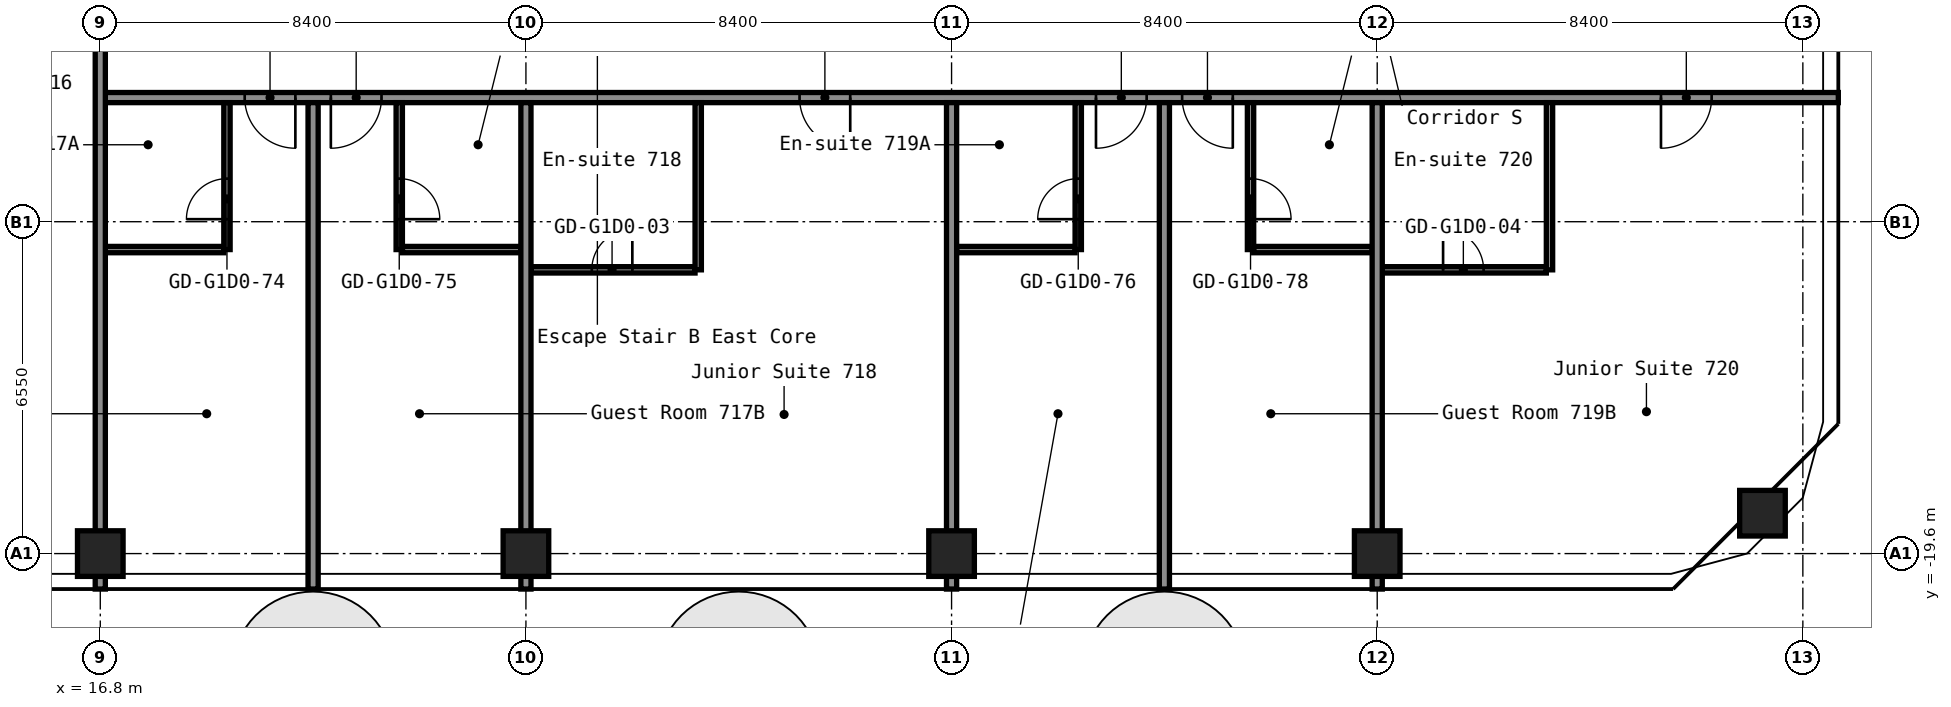
"""IFC4 building model, lengths in metres.
Left out: names, types, materials, properties, quantities, classifications, styles, units other than length and angle.
Written with IfcOpenShell. Run it as: python <this file> out.ifc"""

import sys

from ifc_helpers import new_model, si_unit, direction, frame, frame_2d, origin, origin_2d, place, context, subcontext, project, spatial, rectangle, hollow_rectangle, extrude, element, fill, save


model = new_model("IFC4")
c1 = context("Model", 3, precision=1e-05, world=origin(), true_north=direction((0.0, 1.0)))
c2 = subcontext(c1, "Body", "Model", "MODEL_VIEW")
j1 = project(units=[si_unit("LENGTHUNIT", "METRE"), si_unit("PLANEANGLEUNIT", "RADIAN")], contexts=[c1])
p1 = place(None, origin())
s1 = spatial("IfcSite", under=j1, at=p1, CompositionType="ELEMENT")
p2 = place(p1, origin())
s2 = spatial("IfcBuilding", under=s1, at=p2, CompositionType="ELEMENT")
p3 = place(p2, frame((0.0, 0.0, 29.4)))
s3 = spatial("IfcBuildingStorey", under=s2, at=p3, CompositionType="ELEMENT", Elevation=29.4)
for number, where, z_axis, x_axis in (
    (1, (16.8, -19.6, 0.0), (0.0, 0.0, 1.0), (1.0, 0.0, 0.0)),
    (2, (25.2, -19.6, 0.0), (0.0, 0.0, 1.0), (1.0, 0.0, 0.0)),
    (3, (33.6, -19.6, 0.0), (0.0, 0.0, 1.0), (1.0, 0.0, 0.0)),
    (4, (42.0, -19.6, 0.0), (0.0, 0.0, 1.0), (1.0, 0.0, 0.0)),
    (5, (49.603, -18.803, 0.0), (0.0, 0.0, 1.0), (1.0, 0.0, 0.0)),
):
    element("IfcColumn", number, at=place(p3, frame(where, z_axis=z_axis, x_axis=x_axis)), inside=s3, PredefinedType="COLUMN", context=c2, shape_type="SweptSolid", body=[
        extrude(hollow_rectangle(XDim=0.9, YDim=0.9, WallThickness=0.036, at=origin_2d()), origin(), (0.0, 0.0, 1.0), 2.8),
    ])
p4 = place(p3, frame((25.3, -14.0, 0.0), z_axis=(0.0, 0.0, 1.0), x_axis=(1.0, 0.0, 0.0)))
e6 = element("IfcWall", 6, at=p4, inside=s3, PredefinedType="PARTITIONING", context=c2, shape_type="SweptSolid", body=[
    extrude(rectangle(XDim=3.238, YDim=0.125, at=frame_2d((1.619, 0.0))), origin(), (0.0, 0.0, 1.0), 2.8),
])
p5 = place(p4, frame((1.2, 0.0, 0.0)))
e7 = element("IfcOpeningElement", 7, at=p5, cuts=e6, PredefinedType="OPENING", context=c2, shape_type="SweptSolid", body=[
    extrude(rectangle(XDim=0.8, YDim=2.1, at=frame_2d((0.4, 1.05))), frame((0.0, 0.073, 0.0), z_axis=(0.0, -1.0, 0.0), x_axis=(1.0, 0.0, 0.0)), (0.0, 0.0, 1.0), 0.145),
])
p6 = place(p3, frame((42.1, -14.0, 0.0), z_axis=(0.0, 0.0, 1.0), x_axis=(1.0, 0.0, 0.0)))
e8 = element("IfcWall", 8, at=p6, inside=s3, PredefinedType="PARTITIONING", context=c2, shape_type="SweptSolid", body=[
    extrude(rectangle(XDim=3.237, YDim=0.125, at=frame_2d((1.619, 0.0))), origin(), (0.0, 0.0, 1.0), 2.8),
])
p7 = place(p6, frame((1.2, 0.0, 0.0)))
e9 = element("IfcOpeningElement", 9, at=p7, cuts=e8, PredefinedType="OPENING", context=c2, shape_type="SweptSolid", body=[
    extrude(rectangle(XDim=0.8, YDim=2.1, at=frame_2d((0.4, 1.05))), frame((0.0, 0.073, 0.0), z_axis=(0.0, -1.0, 0.0), x_axis=(1.0, 0.0, 0.0)), (0.0, 0.0, 1.0), 0.145),
])
for number, where, z_axis, x_axis in (
    (10, (16.9, -13.6, 0.0), (0.0, 0.0, 1.0), (1.0, 0.0, 0.0)),
    (11, (22.762, -13.6, 0.0), (0.0, 0.0, 1.0), (1.0, 0.0, 0.0)),
    (12, (33.7, -13.6, 0.0), (0.0, 0.0, 1.0), (1.0, 0.0, 0.0)),
):
    element("IfcWall", number, at=place(p3, frame(where, z_axis=z_axis, x_axis=x_axis)), inside=s3, PredefinedType="PARTITIONING", context=c2, shape_type="SweptSolid", body=[
        extrude(rectangle(XDim=2.338, YDim=0.125, at=frame_2d((1.169, 0.0))), origin(), (0.0, 0.0, 1.0), 2.8),
    ])
p8 = place(p3, frame((39.562, -13.6, 0.0), z_axis=(0.0, 0.0, 1.0), x_axis=(1.0, 0.0, 0.0)))
e13 = element("IfcWall", 13, at=p8, inside=s3, PredefinedType="PARTITIONING", context=c2, shape_type="SweptSolid", body=[
    extrude(rectangle(XDim=2.337, YDim=0.125, at=frame_2d((1.169, 0.0))), origin(), (0.0, 0.0, 1.0), 2.8),
])
p9 = place(p3, frame((16.8, -10.6, 0.0), z_axis=(0.0, 0.0, 1.0), x_axis=(1.0, 0.0, 0.0)))
e14 = element("IfcWall", 14, at=p9, inside=s3, PredefinedType="PARTITIONING", context=c2, shape_type="SweptSolid", body=[
    extrude(rectangle(XDim=34.3, YDim=0.2, at=frame_2d((17.15, 0.0))), origin(), (0.0, 0.0, 1.0), 2.8),
])
p10 = place(p9, frame((2.85, 0.0, 0.0)))
e15 = element("IfcOpeningElement", 15, at=p10, cuts=e14, PredefinedType="OPENING", context=c2, shape_type="SweptSolid", body=[
    extrude(rectangle(XDim=1.0, YDim=2.1, at=frame_2d((0.5, 1.05))), frame((0.0, 0.11, 0.0), z_axis=(0.0, -1.0, 0.0), x_axis=(1.0, 0.0, 0.0)), (0.0, 0.0, 1.0), 0.22),
])
p11 = place(p9, frame((4.55, 0.0, 0.0)))
e16 = element("IfcOpeningElement", 16, at=p11, cuts=e14, PredefinedType="OPENING", context=c2, shape_type="SweptSolid", body=[
    extrude(rectangle(XDim=1.0, YDim=2.1, at=frame_2d((0.5, 1.05))), frame((0.0, 0.11, 0.0), z_axis=(0.0, -1.0, 0.0), x_axis=(1.0, 0.0, 0.0)), (0.0, 0.0, 1.0), 0.22),
])
p12 = place(p9, frame((13.8, 0.0, 0.0)))
e17 = element("IfcOpeningElement", 17, at=p12, cuts=e14, PredefinedType="OPENING", context=c2, shape_type="SweptSolid", body=[
    extrude(rectangle(XDim=1.0, YDim=2.1, at=frame_2d((0.5, 1.05))), frame((0.0, 0.11, 0.0), z_axis=(0.0, -1.0, 0.0), x_axis=(1.0, 0.0, 0.0)), (0.0, 0.0, 1.0), 0.22),
])
p13 = place(p9, frame((19.65, 0.0, 0.0)))
e18 = element("IfcOpeningElement", 18, at=p13, cuts=e14, PredefinedType="OPENING", context=c2, shape_type="SweptSolid", body=[
    extrude(rectangle(XDim=1.0, YDim=2.1, at=frame_2d((0.5, 1.05))), frame((0.0, 0.11, 0.0), z_axis=(0.0, -1.0, 0.0), x_axis=(1.0, 0.0, 0.0)), (0.0, 0.0, 1.0), 0.22),
])
p14 = place(p9, frame((21.35, 0.0, 0.0)))
e19 = element("IfcOpeningElement", 19, at=p14, cuts=e14, PredefinedType="OPENING", context=c2, shape_type="SweptSolid", body=[
    extrude(rectangle(XDim=1.0, YDim=2.1, at=frame_2d((0.5, 1.05))), frame((0.0, 0.11, 0.0), z_axis=(0.0, -1.0, 0.0), x_axis=(1.0, 0.0, 0.0)), (0.0, 0.0, 1.0), 0.22),
])
p15 = place(p9, frame((30.8, 0.0, 0.0)))
e20 = element("IfcOpeningElement", 20, at=p15, cuts=e14, PredefinedType="OPENING", context=c2, shape_type="SweptSolid", body=[
    extrude(rectangle(XDim=1.0, YDim=2.1, at=frame_2d((0.5, 1.05))), frame((0.0, 0.11, 0.0), z_axis=(0.0, -1.0, 0.0), x_axis=(1.0, 0.0, 0.0)), (0.0, 0.0, 1.0), 0.22),
])
p16 = place(p3, frame((16.8, -20.3, 0.0), z_axis=(0.0, 0.0, 1.0), x_axis=(0.0, 1.0, 0.0)))
e21 = element("IfcWall", 21, at=p16, inside=s3, PredefinedType="PARTITIONING", context=c2, shape_type="SweptSolid", body=[
    extrude(rectangle(XDim=11.91, YDim=0.2, at=frame_2d((5.955, 0.0))), origin(), (0.0, 0.0, 1.0), 2.8),
])
p17 = place(p3, frame((19.3, -13.6, 0.0), z_axis=(0.0, 0.0, 1.0), x_axis=(0.0, 1.0, 0.0)))
e22 = element("IfcWall", 22, at=p17, inside=s3, PredefinedType="PARTITIONING", context=c2, shape_type="SweptSolid", body=[
    extrude(rectangle(XDim=2.9, YDim=0.125, at=frame_2d((1.45, 0.0))), origin(), (0.0, 0.0, 1.0), 2.8),
])
p18 = place(p17, frame((0.6, 0.0, 0.0)))
e23 = element("IfcOpeningElement", 23, at=p18, cuts=e22, PredefinedType="OPENING", context=c2, shape_type="SweptSolid", body=[
    extrude(rectangle(XDim=0.8, YDim=2.1, at=frame_2d((0.4, 1.05))), frame((0.0, 0.073, 0.0), z_axis=(0.0, -1.0, 0.0), x_axis=(1.0, 0.0, 0.0)), (0.0, 0.0, 1.0), 0.145),
])
p19 = place(p3, frame((21.0, -20.3, 0.0), z_axis=(0.0, 0.0, 1.0), x_axis=(0.0, 1.0, 0.0)))
e24 = element("IfcWall", 24, at=p19, inside=s3, PredefinedType="PARTITIONING", context=c2, shape_type="SweptSolid", body=[
    extrude(rectangle(XDim=9.6, YDim=0.2, at=frame_2d((4.8, 0.0))), origin(), (0.0, 0.0, 1.0), 2.8),
])
p20 = place(p3, frame((22.7, -13.6, 0.0), z_axis=(0.0, 0.0, 1.0), x_axis=(0.0, 1.0, 0.0)))
e25 = element("IfcWall", 25, at=p20, inside=s3, PredefinedType="PARTITIONING", context=c2, shape_type="SweptSolid", body=[
    extrude(rectangle(XDim=2.9, YDim=0.125, at=frame_2d((1.45, 0.0))), origin(), (0.0, 0.0, 1.0), 2.8),
])
p21 = place(p20, frame((0.6, 0.0, 0.0)))
e26 = element("IfcOpeningElement", 26, at=p21, cuts=e25, PredefinedType="OPENING", context=c2, shape_type="SweptSolid", body=[
    extrude(rectangle(XDim=0.8, YDim=2.1, at=frame_2d((0.4, 1.05))), frame((0.0, 0.073, 0.0), z_axis=(0.0, -1.0, 0.0), x_axis=(1.0, 0.0, 0.0)), (0.0, 0.0, 1.0), 0.145),
])
p22 = place(p3, frame((25.2, -20.3, 0.0), z_axis=(0.0, 0.0, 1.0), x_axis=(0.0, 1.0, 0.0)))
e27 = element("IfcWall", 27, at=p22, inside=s3, PredefinedType="PARTITIONING", context=c2, shape_type="SweptSolid", body=[
    extrude(rectangle(XDim=9.6, YDim=0.2, at=frame_2d((4.8, 0.0))), origin(), (0.0, 0.0, 1.0), 2.8),
])
p23 = place(p3, frame((28.6, -14.0, 0.0), z_axis=(0.0, 0.0, 1.0), x_axis=(0.0, 1.0, 0.0)))
e28 = element("IfcWall", 28, at=p23, inside=s3, PredefinedType="PARTITIONING", context=c2, shape_type="SweptSolid", body=[
    extrude(rectangle(XDim=3.3, YDim=0.125, at=frame_2d((1.65, 0.0))), origin(), (0.0, 0.0, 1.0), 2.8),
])
p24 = place(p3, frame((33.6, -20.3, 0.0), z_axis=(0.0, 0.0, 1.0), x_axis=(0.0, 1.0, 0.0)))
e29 = element("IfcWall", 29, at=p24, inside=s3, PredefinedType="PARTITIONING", context=c2, shape_type="SweptSolid", body=[
    extrude(rectangle(XDim=9.6, YDim=0.2, at=frame_2d((4.8, 0.0))), origin(), (0.0, 0.0, 1.0), 2.8),
])
p25 = place(p3, frame((36.1, -13.6, 0.0), z_axis=(0.0, 0.0, 1.0), x_axis=(0.0, 1.0, 0.0)))
e30 = element("IfcWall", 30, at=p25, inside=s3, PredefinedType="PARTITIONING", context=c2, shape_type="SweptSolid", body=[
    extrude(rectangle(XDim=2.9, YDim=0.125, at=frame_2d((1.45, 0.0))), origin(), (0.0, 0.0, 1.0), 2.8),
])
p26 = place(p25, frame((0.6, 0.0, 0.0)))
e31 = element("IfcOpeningElement", 31, at=p26, cuts=e30, PredefinedType="OPENING", context=c2, shape_type="SweptSolid", body=[
    extrude(rectangle(XDim=0.8, YDim=2.1, at=frame_2d((0.4, 1.05))), frame((0.0, 0.073, 0.0), z_axis=(0.0, -1.0, 0.0), x_axis=(1.0, 0.0, 0.0)), (0.0, 0.0, 1.0), 0.145),
])
p27 = place(p3, frame((37.8, -20.3, 0.0), z_axis=(0.0, 0.0, 1.0), x_axis=(0.0, 1.0, 0.0)))
e32 = element("IfcWall", 32, at=p27, inside=s3, PredefinedType="PARTITIONING", context=c2, shape_type="SweptSolid", body=[
    extrude(rectangle(XDim=9.6, YDim=0.2, at=frame_2d((4.8, 0.0))), origin(), (0.0, 0.0, 1.0), 2.8),
])
p28 = place(p3, frame((39.5, -13.6, 0.0), z_axis=(0.0, 0.0, 1.0), x_axis=(0.0, 1.0, 0.0)))
e33 = element("IfcWall", 33, at=p28, inside=s3, PredefinedType="PARTITIONING", context=c2, shape_type="SweptSolid", body=[
    extrude(rectangle(XDim=2.9, YDim=0.125, at=frame_2d((1.45, 0.0))), origin(), (0.0, 0.0, 1.0), 2.8),
])
p29 = place(p28, frame((0.6, 0.0, 0.0)))
e34 = element("IfcOpeningElement", 34, at=p29, cuts=e33, PredefinedType="OPENING", context=c2, shape_type="SweptSolid", body=[
    extrude(rectangle(XDim=0.8, YDim=2.1, at=frame_2d((0.4, 1.05))), frame((0.0, 0.073, 0.0), z_axis=(0.0, -1.0, 0.0), x_axis=(1.0, 0.0, 0.0)), (0.0, 0.0, 1.0), 0.145),
])
p30 = place(p3, frame((42.0, -20.3, 0.0), z_axis=(0.0, 0.0, 1.0), x_axis=(0.0, 1.0, 0.0)))
e35 = element("IfcWall", 35, at=p30, inside=s3, PredefinedType="PARTITIONING", context=c2, shape_type="SweptSolid", body=[
    extrude(rectangle(XDim=9.6, YDim=0.2, at=frame_2d((4.8, 0.0))), origin(), (0.0, 0.0, 1.0), 2.8),
])
p31 = place(p3, frame((45.4, -14.0, 0.0), z_axis=(0.0, 0.0, 1.0), x_axis=(0.0, 1.0, 0.0)))
e36 = element("IfcWall", 36, at=p31, inside=s3, PredefinedType="PARTITIONING", context=c2, shape_type="SweptSolid", body=[
    extrude(rectangle(XDim=3.3, YDim=0.125, at=frame_2d((1.65, 0.0))), origin(), (0.0, 0.0, 1.0), 2.8),
])
p32 = place(p5, origin())
e37 = element("IfcDoor", 37, at=p32, inside=s3, OperationType="SINGLE_SWING_LEFT", PredefinedType="DOOR", context=c2, shape_type="SweptSolid", body=[
    extrude(rectangle(XDim=0.8, YDim=2.1, at=frame_2d((0.4, 1.05))), frame((0.0, 0.025, 0.0), z_axis=(0.0, -1.0, 0.0), x_axis=(1.0, 0.0, 0.0)), (0.0, 0.0, 1.0), 0.05),
])
fill(e7, e37)
p33 = place(p7, origin())
e38 = element("IfcDoor", 38, at=p33, inside=s3, OperationType="SINGLE_SWING_RIGHT", PredefinedType="DOOR", context=c2, shape_type="SweptSolid", body=[
    extrude(rectangle(XDim=0.8, YDim=2.1, at=frame_2d((0.4, 1.05))), frame((0.0, 0.025, 0.0), z_axis=(0.0, -1.0, 0.0), x_axis=(1.0, 0.0, 0.0)), (0.0, 0.0, 1.0), 0.05),
])
fill(e9, e38)
p34 = place(p10, origin())
e39 = element("IfcDoor", 39, at=p34, inside=s3, OperationType="SINGLE_SWING_RIGHT", PredefinedType="DOOR", context=c2, shape_type="SweptSolid", body=[
    extrude(rectangle(XDim=1.0, YDim=2.1, at=frame_2d((0.5, 1.05))), frame((0.0, 0.025, 0.0), z_axis=(0.0, -1.0, 0.0), x_axis=(1.0, 0.0, 0.0)), (0.0, 0.0, 1.0), 0.05),
])
fill(e15, e39)
p35 = place(p11, origin())
e40 = element("IfcDoor", 40, at=p35, inside=s3, OperationType="SINGLE_SWING_LEFT", PredefinedType="DOOR", context=c2, shape_type="SweptSolid", body=[
    extrude(rectangle(XDim=1.0, YDim=2.1, at=frame_2d((0.5, 1.05))), frame((0.0, 0.025, 0.0), z_axis=(0.0, -1.0, 0.0), x_axis=(1.0, 0.0, 0.0)), (0.0, 0.0, 1.0), 0.05),
])
fill(e16, e40)
p36 = place(p12, origin())
e41 = element("IfcDoor", 41, at=p36, inside=s3, OperationType="SINGLE_SWING_RIGHT", PredefinedType="DOOR", context=c2, shape_type="SweptSolid", body=[
    extrude(rectangle(XDim=1.0, YDim=2.1, at=frame_2d((0.5, 1.05))), frame((0.0, 0.025, 0.0), z_axis=(0.0, -1.0, 0.0), x_axis=(1.0, 0.0, 0.0)), (0.0, 0.0, 1.0), 0.05),
])
fill(e17, e41)
p37 = place(p13, origin())
e42 = element("IfcDoor", 42, at=p37, inside=s3, OperationType="SINGLE_SWING_LEFT", PredefinedType="DOOR", context=c2, shape_type="SweptSolid", body=[
    extrude(rectangle(XDim=1.0, YDim=2.1, at=frame_2d((0.5, 1.05))), frame((0.0, 0.025, 0.0), z_axis=(0.0, -1.0, 0.0), x_axis=(1.0, 0.0, 0.0)), (0.0, 0.0, 1.0), 0.05),
])
fill(e18, e42)
p38 = place(p14, origin())
e43 = element("IfcDoor", 43, at=p38, inside=s3, OperationType="SINGLE_SWING_RIGHT", PredefinedType="DOOR", context=c2, shape_type="SweptSolid", body=[
    extrude(rectangle(XDim=1.0, YDim=2.1, at=frame_2d((0.5, 1.05))), frame((0.0, 0.025, 0.0), z_axis=(0.0, -1.0, 0.0), x_axis=(1.0, 0.0, 0.0)), (0.0, 0.0, 1.0), 0.05),
])
fill(e19, e43)
p39 = place(p15, origin())
e44 = element("IfcDoor", 44, at=p39, inside=s3, OperationType="SINGLE_SWING_LEFT", PredefinedType="DOOR", context=c2, shape_type="SweptSolid", body=[
    extrude(rectangle(XDim=1.0, YDim=2.1, at=frame_2d((0.5, 1.05))), frame((0.0, 0.025, 0.0), z_axis=(0.0, -1.0, 0.0), x_axis=(1.0, 0.0, 0.0)), (0.0, 0.0, 1.0), 0.05),
])
fill(e20, e44)
p40 = place(p18, origin())
e45 = element("IfcDoor", 45, at=p40, inside=s3, OperationType="SINGLE_SWING_RIGHT", PredefinedType="DOOR", context=c2, shape_type="SweptSolid", body=[
    extrude(rectangle(XDim=0.8, YDim=2.1, at=frame_2d((0.4, 1.05))), frame((0.0, 0.025, 0.0), z_axis=(0.0, -1.0, 0.0), x_axis=(1.0, 0.0, 0.0)), (0.0, 0.0, 1.0), 0.05),
])
fill(e23, e45)
p41 = place(p21, origin())
e46 = element("IfcDoor", 46, at=p41, inside=s3, OperationType="SINGLE_SWING_LEFT", PredefinedType="DOOR", context=c2, shape_type="SweptSolid", body=[
    extrude(rectangle(XDim=0.8, YDim=2.1, at=frame_2d((0.4, 1.05))), frame((0.0, 0.025, 0.0), z_axis=(0.0, -1.0, 0.0), x_axis=(1.0, 0.0, 0.0)), (0.0, 0.0, 1.0), 0.05),
])
fill(e26, e46)
p42 = place(p26, origin())
e47 = element("IfcDoor", 47, at=p42, inside=s3, OperationType="SINGLE_SWING_RIGHT", PredefinedType="DOOR", context=c2, shape_type="SweptSolid", body=[
    extrude(rectangle(XDim=0.8, YDim=2.1, at=frame_2d((0.4, 1.05))), frame((0.0, 0.025, 0.0), z_axis=(0.0, -1.0, 0.0), x_axis=(1.0, 0.0, 0.0)), (0.0, 0.0, 1.0), 0.05),
])
fill(e31, e47)
p43 = place(p29, origin())
e48 = element("IfcDoor", 48, at=p43, inside=s3, OperationType="SINGLE_SWING_LEFT", PredefinedType="DOOR", context=c2, shape_type="SweptSolid", body=[
    extrude(rectangle(XDim=0.8, YDim=2.1, at=frame_2d((0.4, 1.05))), frame((0.0, 0.025, 0.0), z_axis=(0.0, -1.0, 0.0), x_axis=(1.0, 0.0, 0.0)), (0.0, 0.0, 1.0), 0.05),
])
fill(e34, e48)
save(model, sys.argv[1])
